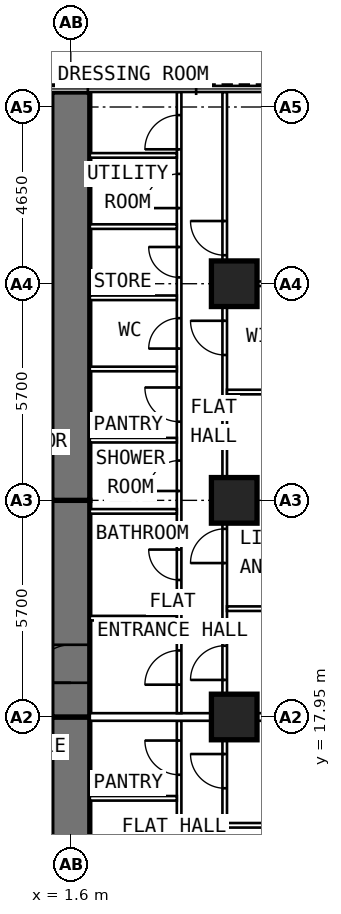
"""IFC4 building model, lengths in metres.
Left out: names, types, materials, properties, quantities, classifications, styles, units other than length and angle.
Written with IfcOpenShell. Run it as: python <this file> out.ifc"""

import sys

from ifc_helpers import new_model, si_unit, direction, frame, frame_2d, origin, origin_2d, place, context, subcontext, project, spatial, rectangle, extrude, element, fill, save


model = new_model("IFC4")
c1 = context("Model", 3, precision=1e-05, world=origin(), true_north=direction((0.0, 1.0)))
c2 = subcontext(c1, "Body", "Model", "MODEL_VIEW")
j1 = project(units=[si_unit("LENGTHUNIT", "METRE"), si_unit("PLANEANGLEUNIT", "RADIAN")], contexts=[c1])
p1 = place(None, origin())
s1 = spatial("IfcSite", under=j1, at=p1, CompositionType="ELEMENT")
p2 = place(p1, origin())
s2 = spatial("IfcBuilding", under=s1, at=p2, CompositionType="ELEMENT")
p3 = place(p2, frame((0.0, 0.0, 95.2)))
s3 = spatial("IfcBuildingStorey", under=s2, at=p3, CompositionType="ELEMENT", Elevation=95.2)
for number, where, z_axis, x_axis in (
    (1, (5.9, 17.95, 0.0), (0.0, 0.0, 1.0), (0.0, 1.0, 0.0)),
    (2, (5.9, 23.65, 0.0), (0.0, 0.0, 1.0), (0.0, 1.0, 0.0)),
    (3, (5.9, 29.35, 0.0), (0.0, 0.0, 1.0), (0.0, 1.0, 0.0)),
):
    element("IfcColumn", number, at=place(p3, frame(where, z_axis=z_axis, x_axis=x_axis)), inside=s3, PredefinedType="COLUMN", context=c2, shape_type="SweptSolid", body=[
        extrude(rectangle(XDim=1.2, YDim=1.2, at=origin_2d()), origin(), (0.0, 0.0, 1.0), 3.6),
    ])
p4 = place(p3, frame((1.6, 9.6, 0.0), z_axis=(0.0, 0.0, 1.0), x_axis=(0.0, 1.0, 0.0)))
e4 = element("IfcWall", 4, at=p4, inside=s3, PredefinedType="SHEAR", context=c2, shape_type="SweptSolid", body=[
    extrude(rectangle(XDim=8.35, YDim=1.0, at=frame_2d((4.175, 0.0))), origin(), (0.0, 0.0, 1.0), 3.6),
])
p5 = place(p4, frame((1.3, 0.0, 0.0)))
e5 = element("IfcOpeningElement", 5, at=p5, cuts=e4, PredefinedType="OPENING", context=c2, shape_type="SweptSolid", body=[
    extrude(rectangle(XDim=1.0, YDim=2.1, at=frame_2d((0.5, 1.05))), frame((0.0, 0.512, 0.0), z_axis=(0.0, -1.0, 0.0), x_axis=(1.0, 0.0, 0.0)), (0.0, 0.0, 1.0), 1.024),
])
p6 = place(p3, frame((1.6, 17.95, 0.0), z_axis=(0.0, 0.0, 1.0), x_axis=(0.0, 1.0, 0.0)))
e6 = element("IfcWall", 6, at=p6, inside=s3, PredefinedType="SHEAR", context=c2, shape_type="SweptSolid", body=[
    extrude(rectangle(XDim=5.7, YDim=1.0, at=frame_2d((2.85, 0.0))), origin(), (0.0, 0.0, 1.0), 3.6),
])
p7 = place(p6, frame((0.9, 0.0, 0.0)))
e7 = element("IfcOpeningElement", 7, at=p7, cuts=e6, PredefinedType="OPENING", context=c2, shape_type="SweptSolid", body=[
    extrude(rectangle(XDim=1.0, YDim=2.1, at=frame_2d((0.5, 1.05))), frame((0.0, 0.512, 0.0), z_axis=(0.0, -1.0, 0.0), x_axis=(1.0, 0.0, 0.0)), (0.0, 0.0, 1.0), 1.024),
])
p8 = place(p3, frame((1.6, 23.65, 0.0), z_axis=(0.0, 0.0, 1.0), x_axis=(0.0, 1.0, 0.0)))
e8 = element("IfcWall", 8, at=p8, inside=s3, PredefinedType="SHEAR", context=c2, shape_type="SweptSolid", body=[
    extrude(rectangle(XDim=10.745, YDim=1.0, at=frame_2d((5.373, 0.0))), origin(), (0.0, 0.0, 1.0), 3.6),
])
p9 = place(p3, frame((4.45, 10.1, 0.0), z_axis=(0.0, 0.0, 1.0), x_axis=(0.0, 1.0, 0.0)))
e9 = element("IfcWall", 9, at=p9, inside=s3, PredefinedType="PARTITIONING", context=c2, shape_type="SweptSolid", body=[
    extrude(rectangle(XDim=7.75, YDim=0.12, at=frame_2d((3.875, 0.0))), origin(), (0.0, 0.0, 1.0), 3.35),
])
p10 = place(p9, frame((0.75, 0.0, 0.0)))
e10 = element("IfcOpeningElement", 10, at=p10, cuts=e9, PredefinedType="OPENING", context=c2, shape_type="SweptSolid", body=[
    extrude(rectangle(XDim=0.9, YDim=2.1, at=frame_2d((0.45, 1.05))), frame((0.0, 0.072, 0.0), z_axis=(0.0, -1.0, 0.0), x_axis=(1.0, 0.0, 0.0)), (0.0, 0.0, 1.0), 0.144),
])
p11 = place(p9, frame((3.705, 0.0, 0.0)))
e11 = element("IfcOpeningElement", 11, at=p11, cuts=e9, PredefinedType="OPENING", context=c2, shape_type="SweptSolid", body=[
    extrude(rectangle(XDim=0.8, YDim=2.1, at=frame_2d((0.4, 1.05))), frame((0.0, 0.072, 0.0), z_axis=(0.0, -1.0, 0.0), x_axis=(1.0, 0.0, 0.0)), (0.0, 0.0, 1.0), 0.144),
])
p12 = place(p9, frame((6.33, 0.0, 0.0)))
e12 = element("IfcOpeningElement", 12, at=p12, cuts=e9, PredefinedType="OPENING", context=c2, shape_type="SweptSolid", body=[
    extrude(rectangle(XDim=0.9, YDim=2.1, at=frame_2d((0.45, 1.05))), frame((0.0, 0.072, 0.0), z_axis=(0.0, -1.0, 0.0), x_axis=(1.0, 0.0, 0.0)), (0.0, 0.0, 1.0), 0.144),
])
p13 = place(p3, frame((5.65, 9.6, 0.0), z_axis=(0.0, 0.0, 1.0), x_axis=(0.0, 1.0, 0.0)))
e13 = element("IfcWall", 13, at=p13, inside=s3, PredefinedType="PARTITIONING", context=c2, shape_type="SweptSolid", body=[
    extrude(rectangle(XDim=8.1, YDim=0.12, at=frame_2d((4.05, 0.0))), origin(), (0.0, 0.0, 1.0), 3.35),
])
p14 = place(p13, frame((3.4, 0.0, 0.0)))
e14 = element("IfcOpeningElement", 14, at=p14, cuts=e13, PredefinedType="OPENING", context=c2, shape_type="SweptSolid", body=[
    extrude(rectangle(XDim=0.9, YDim=2.1, at=frame_2d((0.45, 1.05))), frame((0.0, 0.072, 0.0), z_axis=(0.0, -1.0, 0.0), x_axis=(1.0, 0.0, 0.0)), (0.0, 0.0, 1.0), 0.144),
])
p15 = place(p13, frame((6.475, 0.0, 0.0)))
e15 = element("IfcOpeningElement", 15, at=p15, cuts=e13, PredefinedType="OPENING", context=c2, shape_type="SweptSolid", body=[
    extrude(rectangle(XDim=0.9, YDim=2.1, at=frame_2d((0.45, 1.05))), frame((0.0, 0.072, 0.0), z_axis=(0.0, -1.0, 0.0), x_axis=(1.0, 0.0, 0.0)), (0.0, 0.0, 1.0), 0.144),
])
p16 = place(p3, frame((5.71, 15.1, 0.0), z_axis=(0.0, 0.0, 1.0), x_axis=(1.0, 0.0, 0.0)))
e16 = element("IfcWall", 16, at=p16, inside=s3, PredefinedType="PARTITIONING", context=c2, shape_type="SweptSolid", body=[
    extrude(rectangle(XDim=4.99, YDim=0.12, at=frame_2d((2.495, 0.0))), origin(), (0.0, 0.0, 1.0), 3.35),
])
p17 = place(p3, frame((2.1, 15.81, 0.0), z_axis=(0.0, 0.0, 1.0), x_axis=(1.0, 0.0, 0.0)))
e17 = element("IfcWall", 17, at=p17, inside=s3, PredefinedType="PARTITIONING", context=c2, shape_type="SweptSolid", body=[
    extrude(rectangle(XDim=2.29, YDim=0.12, at=frame_2d((1.145, 0.0))), origin(), (0.0, 0.0, 1.0), 3.35),
])
p18 = place(p3, frame((4.45, 18.05, 0.0), z_axis=(0.0, 0.0, 1.0), x_axis=(0.0, 1.0, 0.0)))
e18 = element("IfcWall", 18, at=p18, inside=s3, PredefinedType="PARTITIONING", context=c2, shape_type="SweptSolid", body=[
    extrude(rectangle(XDim=16.345, YDim=0.12, at=frame_2d((8.172, 0.0))), origin(), (0.0, 0.0, 1.0), 3.35),
])
p19 = place(p18, frame((0.75, 0.0, 0.0)))
e19 = element("IfcOpeningElement", 19, at=p19, cuts=e18, PredefinedType="OPENING", context=c2, shape_type="SweptSolid", body=[
    extrude(rectangle(XDim=0.9, YDim=2.1, at=frame_2d((0.45, 1.05))), frame((0.0, 0.072, 0.0), z_axis=(0.0, -1.0, 0.0), x_axis=(1.0, 0.0, 0.0)), (0.0, 0.0, 1.0), 0.144),
])
p20 = place(p18, frame((3.505, 0.0, 0.0)))
e20 = element("IfcOpeningElement", 20, at=p20, cuts=e18, PredefinedType="OPENING", context=c2, shape_type="SweptSolid", body=[
    extrude(rectangle(XDim=0.8, YDim=2.1, at=frame_2d((0.4, 1.05))), frame((0.0, 0.072, 0.0), z_axis=(0.0, -1.0, 0.0), x_axis=(1.0, 0.0, 0.0)), (0.0, 0.0, 1.0), 0.144),
])
p21 = place(p18, frame((5.847, 0.0, 0.0)))
e21 = element("IfcOpeningElement", 21, at=p21, cuts=e18, PredefinedType="OPENING", context=c2, shape_type="SweptSolid", body=[
    extrude(rectangle(XDim=0.8, YDim=2.1, at=frame_2d((0.4, 1.05))), frame((0.0, 0.072, 0.0), z_axis=(0.0, -1.0, 0.0), x_axis=(1.0, 0.0, 0.0)), (0.0, 0.0, 1.0), 0.144),
])
p22 = place(p18, frame((7.67, 0.0, 0.0)))
e22 = element("IfcOpeningElement", 22, at=p22, cuts=e18, PredefinedType="OPENING", context=c2, shape_type="SweptSolid", body=[
    extrude(rectangle(XDim=0.9, YDim=2.1, at=frame_2d((0.45, 1.05))), frame((0.0, 0.072, 0.0), z_axis=(0.0, -1.0, 0.0), x_axis=(1.0, 0.0, 0.0)), (0.0, 0.0, 1.0), 0.144),
])
p23 = place(p18, frame((9.593, 0.0, 0.0)))
e23 = element("IfcOpeningElement", 23, at=p23, cuts=e18, PredefinedType="OPENING", context=c2, shape_type="SweptSolid", body=[
    extrude(rectangle(XDim=0.8, YDim=2.1, at=frame_2d((0.4, 1.05))), frame((0.0, 0.072, 0.0), z_axis=(0.0, -1.0, 0.0), x_axis=(1.0, 0.0, 0.0)), (0.0, 0.0, 1.0), 0.144),
])
p24 = place(p18, frame((11.467, 0.0, 0.0)))
e24 = element("IfcOpeningElement", 24, at=p24, cuts=e18, PredefinedType="OPENING", context=c2, shape_type="SweptSolid", body=[
    extrude(rectangle(XDim=0.8, YDim=2.1, at=frame_2d((0.4, 1.05))), frame((0.0, 0.072, 0.0), z_axis=(0.0, -1.0, 0.0), x_axis=(1.0, 0.0, 0.0)), (0.0, 0.0, 1.0), 0.144),
])
p25 = place(p18, frame((13.29, 0.0, 0.0)))
e25 = element("IfcOpeningElement", 25, at=p25, cuts=e18, PredefinedType="OPENING", context=c2, shape_type="SweptSolid", body=[
    extrude(rectangle(XDim=0.9, YDim=2.1, at=frame_2d((0.45, 1.05))), frame((0.0, 0.072, 0.0), z_axis=(0.0, -1.0, 0.0), x_axis=(1.0, 0.0, 0.0)), (0.0, 0.0, 1.0), 0.144),
])
p26 = place(p18, frame((14.837, 0.0, 0.0)))
e26 = element("IfcOpeningElement", 26, at=p26, cuts=e18, PredefinedType="OPENING", context=c2, shape_type="SweptSolid", body=[
    extrude(rectangle(XDim=0.9, YDim=2.1, at=frame_2d((0.45, 1.05))), frame((0.0, 0.072, 0.0), z_axis=(0.0, -1.0, 0.0), x_axis=(1.0, 0.0, 0.0)), (0.0, 0.0, 1.0), 0.144),
])
p27 = place(p3, frame((5.65, 18.05, 0.0), z_axis=(0.0, 0.0, 1.0), x_axis=(0.0, 1.0, 0.0)))
e27 = element("IfcWall", 27, at=p27, inside=s3, PredefinedType="PARTITIONING", context=c2, shape_type="SweptSolid", body=[
    extrude(rectangle(XDim=16.345, YDim=0.12, at=frame_2d((8.172, 0.0))), origin(), (0.0, 0.0, 1.0), 3.35),
])
p28 = place(p27, frame((0.875, 0.0, 0.0)))
e28 = element("IfcOpeningElement", 28, at=p28, cuts=e27, PredefinedType="OPENING", context=c2, shape_type="SweptSolid", body=[
    extrude(rectangle(XDim=0.9, YDim=2.1, at=frame_2d((0.45, 1.05))), frame((0.0, 0.072, 0.0), z_axis=(0.0, -1.0, 0.0), x_axis=(1.0, 0.0, 0.0)), (0.0, 0.0, 1.0), 0.144),
])
p29 = place(p27, frame((3.95, 0.0, 0.0)))
e29 = element("IfcOpeningElement", 29, at=p29, cuts=e27, PredefinedType="OPENING", context=c2, shape_type="SweptSolid", body=[
    extrude(rectangle(XDim=0.9, YDim=2.1, at=frame_2d((0.45, 1.05))), frame((0.0, 0.072, 0.0), z_axis=(0.0, -1.0, 0.0), x_axis=(1.0, 0.0, 0.0)), (0.0, 0.0, 1.0), 0.144),
])
p30 = place(p27, frame((9.425, 0.0, 0.0)))
e30 = element("IfcOpeningElement", 30, at=p30, cuts=e27, PredefinedType="OPENING", context=c2, shape_type="SweptSolid", body=[
    extrude(rectangle(XDim=0.9, YDim=2.1, at=frame_2d((0.45, 1.05))), frame((0.0, 0.072, 0.0), z_axis=(0.0, -1.0, 0.0), x_axis=(1.0, 0.0, 0.0)), (0.0, 0.0, 1.0), 0.144),
])
p31 = place(p27, frame((12.05, 0.0, 0.0)))
e31 = element("IfcOpeningElement", 31, at=p31, cuts=e27, PredefinedType="OPENING", context=c2, shape_type="SweptSolid", body=[
    extrude(rectangle(XDim=0.9, YDim=2.1, at=frame_2d((0.45, 1.05))), frame((0.0, 0.072, 0.0), z_axis=(0.0, -1.0, 0.0), x_axis=(1.0, 0.0, 0.0)), (0.0, 0.0, 1.0), 0.144),
])
for number, where, z_axis, x_axis in (
    (32, (5.71, 20.8, 0.0), (0.0, 0.0, 1.0), (1.0, 0.0, 0.0)),
    (33, (5.71, 26.5, 0.0), (0.0, 0.0, 1.0), (1.0, 0.0, 0.0)),
):
    element("IfcWall", number, at=place(p3, frame(where, z_axis=z_axis, x_axis=x_axis)), inside=s3, PredefinedType="PARTITIONING", context=c2, shape_type="SweptSolid", body=[
        extrude(rectangle(XDim=4.99, YDim=0.12, at=frame_2d((2.495, 0.0))), origin(), (0.0, 0.0, 1.0), 3.35),
    ])
p32 = place(p3, frame((5.71, 29.35, 0.0), z_axis=(0.0, 0.0, 1.0), x_axis=(1.0, 0.0, 0.0)))
e34 = element("IfcWall", 34, at=p32, inside=s3, PredefinedType="PARTITIONING", context=c2, shape_type="SweptSolid", body=[
    extrude(rectangle(XDim=4.99, YDim=0.12, at=frame_2d((2.495, 0.0))), origin(), (0.0, 0.0, 1.0), 2.45),
])
p33 = place(p3, frame((2.1, 20.55, 0.0), z_axis=(0.0, 0.0, 1.0), x_axis=(1.0, 0.0, 0.0)))
e35 = element("IfcWall", 35, at=p33, inside=s3, PredefinedType="PARTITIONING", context=c2, shape_type="SweptSolid", body=[
    extrude(rectangle(XDim=2.29, YDim=0.12, at=frame_2d((1.145, 0.0))), origin(), (0.0, 0.0, 1.0), 3.35),
])
p34 = place(p3, frame((2.1, 23.36, 0.0), z_axis=(0.0, 0.0, 1.0), x_axis=(1.0, 0.0, 0.0)))
e36 = element("IfcWall", 36, at=p34, inside=s3, PredefinedType="PARTITIONING", context=c2, shape_type="SweptSolid", body=[
    extrude(rectangle(XDim=2.29, YDim=0.12, at=frame_2d((1.145, 0.0))), origin(), (0.0, 0.0, 1.0), 2.45),
])
for number, where, z_axis, x_axis in (
    (37, (2.1, 25.233, 0.0), (0.0, 0.0, 1.0), (1.0, 0.0, 0.0)),
    (38, (2.1, 27.107, 0.0), (0.0, 0.0, 1.0), (1.0, 0.0, 0.0)),
):
    element("IfcWall", number, at=place(p3, frame(where, z_axis=z_axis, x_axis=x_axis)), inside=s3, PredefinedType="PARTITIONING", context=c2, shape_type="SweptSolid", body=[
        extrude(rectangle(XDim=2.29, YDim=0.12, at=frame_2d((1.145, 0.0))), origin(), (0.0, 0.0, 1.0), 3.35),
    ])
p35 = place(p3, frame((2.1, 28.98, 0.0), z_axis=(0.0, 0.0, 1.0), x_axis=(1.0, 0.0, 0.0)))
e39 = element("IfcWall", 39, at=p35, inside=s3, PredefinedType="PARTITIONING", context=c2, shape_type="SweptSolid", body=[
    extrude(rectangle(XDim=2.29, YDim=0.12, at=frame_2d((1.145, 0.0))), origin(), (0.0, 0.0, 1.0), 2.45),
])
for number, where, z_axis, x_axis in (
    (40, (2.1, 30.853, 0.0), (0.0, 0.0, 1.0), (1.0, 0.0, 0.0)),
    (41, (2.1, 32.727, 0.0), (0.0, 0.0, 1.0), (1.0, 0.0, 0.0)),
):
    element("IfcWall", number, at=place(p3, frame(where, z_axis=z_axis, x_axis=x_axis)), inside=s3, PredefinedType="PARTITIONING", context=c2, shape_type="SweptSolid", body=[
        extrude(rectangle(XDim=2.29, YDim=0.12, at=frame_2d((1.145, 0.0))), origin(), (0.0, 0.0, 1.0), 3.35),
    ])
p36 = place(p3, frame((2.1, 17.95, 0.0), z_axis=(0.0, 0.0, 1.0), x_axis=(1.0, 0.0, 0.0)))
e42 = element("IfcWall", 42, at=p36, inside=s3, PredefinedType="PARTITIONING", context=c2, shape_type="SweptSolid", body=[
    extrude(rectangle(XDim=8.6, YDim=0.2, at=frame_2d((4.3, 0.0))), origin(), (0.0, 0.0, 1.0), 2.45),
])
p37 = place(p15, origin())
e43 = element("IfcDoor", 43, at=p37, inside=s3, OperationType="SINGLE_SWING_RIGHT", PredefinedType="DOOR", context=c2, shape_type="SweptSolid", body=[
    extrude(rectangle(XDim=0.9, YDim=2.1, at=frame_2d((0.45, 1.05))), frame((0.0, 0.025, 0.0), z_axis=(0.0, -1.0, 0.0), x_axis=(1.0, 0.0, 0.0)), (0.0, 0.0, 1.0), 0.05),
])
fill(e15, e43)
p38 = place(p12, origin())
e44 = element("IfcDoor", 44, at=p38, inside=s3, OperationType="SINGLE_SWING_RIGHT", PredefinedType="DOOR", context=c2, shape_type="SweptSolid", body=[
    extrude(rectangle(XDim=0.9, YDim=2.1, at=frame_2d((0.45, 1.05))), frame((0.0, 0.025, 0.0), z_axis=(0.0, -1.0, 0.0), x_axis=(1.0, 0.0, 0.0)), (0.0, 0.0, 1.0), 0.05),
])
fill(e12, e44)
p39 = place(p7, origin())
e45 = element("IfcDoor", 45, at=p39, inside=s3, OperationType="SINGLE_SWING_LEFT", PredefinedType="DOOR", context=c2, shape_type="SweptSolid", body=[
    extrude(rectangle(XDim=1.0, YDim=2.1, at=frame_2d((0.5, 1.05))), frame((0.0, 0.25, 0.0), z_axis=(0.0, -1.0, 0.0), x_axis=(1.0, 0.0, 0.0)), (0.0, 0.0, 1.0), 0.5),
])
fill(e7, e45)
p40 = place(p28, origin())
e46 = element("IfcDoor", 46, at=p40, inside=s3, OperationType="SINGLE_SWING_LEFT", PredefinedType="DOOR", context=c2, shape_type="SweptSolid", body=[
    extrude(rectangle(XDim=0.9, YDim=2.1, at=frame_2d((0.45, 1.05))), frame((0.0, 0.025, 0.0), z_axis=(0.0, -1.0, 0.0), x_axis=(1.0, 0.0, 0.0)), (0.0, 0.0, 1.0), 0.05),
])
fill(e28, e46)
p41 = place(p29, origin())
e47 = element("IfcDoor", 47, at=p41, inside=s3, OperationType="SINGLE_SWING_LEFT", PredefinedType="DOOR", context=c2, shape_type="SweptSolid", body=[
    extrude(rectangle(XDim=0.9, YDim=2.1, at=frame_2d((0.45, 1.05))), frame((0.0, 0.025, 0.0), z_axis=(0.0, -1.0, 0.0), x_axis=(1.0, 0.0, 0.0)), (0.0, 0.0, 1.0), 0.05),
])
fill(e29, e47)
p42 = place(p30, origin())
e48 = element("IfcDoor", 48, at=p42, inside=s3, OperationType="SINGLE_SWING_RIGHT", PredefinedType="DOOR", context=c2, shape_type="SweptSolid", body=[
    extrude(rectangle(XDim=0.9, YDim=2.1, at=frame_2d((0.45, 1.05))), frame((0.0, 0.025, 0.0), z_axis=(0.0, -1.0, 0.0), x_axis=(1.0, 0.0, 0.0)), (0.0, 0.0, 1.0), 0.05),
])
fill(e30, e48)
p43 = place(p31, origin())
e49 = element("IfcDoor", 49, at=p43, inside=s3, OperationType="SINGLE_SWING_RIGHT", PredefinedType="DOOR", context=c2, shape_type="SweptSolid", body=[
    extrude(rectangle(XDim=0.9, YDim=2.1, at=frame_2d((0.45, 1.05))), frame((0.0, 0.025, 0.0), z_axis=(0.0, -1.0, 0.0), x_axis=(1.0, 0.0, 0.0)), (0.0, 0.0, 1.0), 0.05),
])
fill(e31, e49)
p44 = place(p19, origin())
e50 = element("IfcDoor", 50, at=p44, inside=s3, OperationType="SINGLE_SWING_LEFT", PredefinedType="DOOR", context=c2, shape_type="SweptSolid", body=[
    extrude(rectangle(XDim=0.9, YDim=2.1, at=frame_2d((0.45, 1.05))), frame((0.0, 0.025, 0.0), z_axis=(0.0, -1.0, 0.0), x_axis=(1.0, 0.0, 0.0)), (0.0, 0.0, 1.0), 0.05),
])
fill(e19, e50)
p45 = place(p20, origin())
e51 = element("IfcDoor", 51, at=p45, inside=s3, OperationType="SINGLE_SWING_RIGHT", PredefinedType="DOOR", context=c2, shape_type="SweptSolid", body=[
    extrude(rectangle(XDim=0.8, YDim=2.1, at=frame_2d((0.4, 1.05))), frame((0.0, 0.025, 0.0), z_axis=(0.0, -1.0, 0.0), x_axis=(1.0, 0.0, 0.0)), (0.0, 0.0, 1.0), 0.05),
])
fill(e20, e51)
p46 = place(p21, origin())
e52 = element("IfcDoor", 52, at=p46, inside=s3, OperationType="SINGLE_SWING_LEFT", PredefinedType="DOOR", context=c2, shape_type="SweptSolid", body=[
    extrude(rectangle(XDim=0.8, YDim=2.1, at=frame_2d((0.4, 1.05))), frame((0.0, 0.025, 0.0), z_axis=(0.0, -1.0, 0.0), x_axis=(1.0, 0.0, 0.0)), (0.0, 0.0, 1.0), 0.05),
])
fill(e21, e52)
p47 = place(p22, origin())
e53 = element("IfcDoor", 53, at=p47, inside=s3, OperationType="SINGLE_SWING_RIGHT", PredefinedType="DOOR", context=c2, shape_type="SweptSolid", body=[
    extrude(rectangle(XDim=0.9, YDim=2.1, at=frame_2d((0.45, 1.05))), frame((0.0, 0.025, 0.0), z_axis=(0.0, -1.0, 0.0), x_axis=(1.0, 0.0, 0.0)), (0.0, 0.0, 1.0), 0.05),
])
fill(e22, e53)
p48 = place(p23, origin())
e54 = element("IfcDoor", 54, at=p48, inside=s3, OperationType="SINGLE_SWING_LEFT", PredefinedType="DOOR", context=c2, shape_type="SweptSolid", body=[
    extrude(rectangle(XDim=0.8, YDim=2.1, at=frame_2d((0.4, 1.05))), frame((0.0, 0.025, 0.0), z_axis=(0.0, -1.0, 0.0), x_axis=(1.0, 0.0, 0.0)), (0.0, 0.0, 1.0), 0.05),
])
fill(e23, e54)
p49 = place(p24, origin())
e55 = element("IfcDoor", 55, at=p49, inside=s3, OperationType="SINGLE_SWING_RIGHT", PredefinedType="DOOR", context=c2, shape_type="SweptSolid", body=[
    extrude(rectangle(XDim=0.8, YDim=2.1, at=frame_2d((0.4, 1.05))), frame((0.0, 0.025, 0.0), z_axis=(0.0, -1.0, 0.0), x_axis=(1.0, 0.0, 0.0)), (0.0, 0.0, 1.0), 0.05),
])
fill(e24, e55)
p50 = place(p25, origin())
e56 = element("IfcDoor", 56, at=p50, inside=s3, OperationType="SINGLE_SWING_LEFT", PredefinedType="DOOR", context=c2, shape_type="SweptSolid", body=[
    extrude(rectangle(XDim=0.9, YDim=2.1, at=frame_2d((0.45, 1.05))), frame((0.0, 0.025, 0.0), z_axis=(0.0, -1.0, 0.0), x_axis=(1.0, 0.0, 0.0)), (0.0, 0.0, 1.0), 0.05),
])
fill(e25, e56)
p51 = place(p26, origin())
e57 = element("IfcDoor", 57, at=p51, inside=s3, OperationType="SINGLE_SWING_LEFT", PredefinedType="DOOR", context=c2, shape_type="SweptSolid", body=[
    extrude(rectangle(XDim=0.9, YDim=2.1, at=frame_2d((0.45, 1.05))), frame((0.0, 0.025, 0.0), z_axis=(0.0, -1.0, 0.0), x_axis=(1.0, 0.0, 0.0)), (0.0, 0.0, 1.0), 0.05),
])
fill(e26, e57)
save(model, sys.argv[1])
